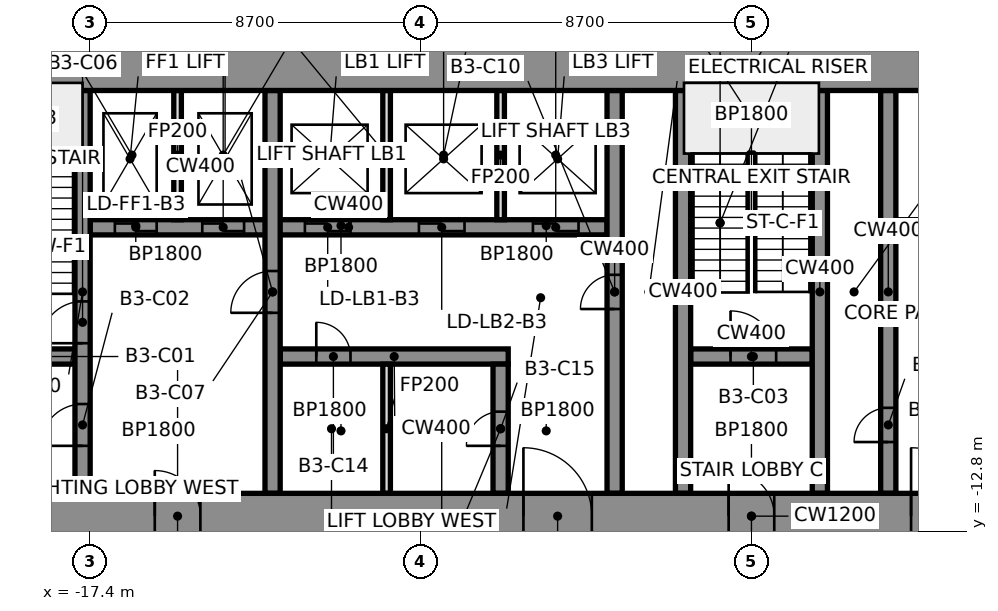
"""IFC4 building model, lengths in metres.
Left out: names, types, materials, properties, quantities, classifications, styles, units other than length and angle.
Written with IfcOpenShell. Run it as: python <this file> out.ifc"""

import sys

from ifc_helpers import new_model, si_unit, direction, frame, frame_2d, origin, place, context, subcontext, project, spatial, rectangle, extrude, element, fill, save


model = new_model("IFC4")
c1 = context("Model", 3, precision=1e-05, world=origin(), true_north=direction((0.0, 1.0)))
c2 = subcontext(c1, "Body", "Model", "MODEL_VIEW")
j1 = project(units=[si_unit("LENGTHUNIT", "METRE"), si_unit("PLANEANGLEUNIT", "RADIAN")], contexts=[c1])
p1 = place(None, origin())
s1 = spatial("IfcSite", under=j1, at=p1, CompositionType="ELEMENT")
p2 = place(p1, origin())
s2 = spatial("IfcBuilding", under=s1, at=p2, CompositionType="ELEMENT")
p3 = place(p2, frame((0.0, 0.0, -15.0)))
s3 = spatial("IfcBuildingStorey", under=s2, at=p3, CompositionType="ELEMENT", Elevation=-15.0)
p4 = place(p3, frame((-20.8, -8.2, 0.0), z_axis=(0.0, 0.0, 1.0), x_axis=(1.0, 0.0, 0.0)))
e1 = element("IfcWall", 1, at=p4, inside=s3, PredefinedType="SHEAR", context=c2, shape_type="SweptSolid", body=[
    extrude(rectangle(XDim=3.0, YDim=0.4, at=frame_2d((1.5, 0.0))), origin(), (0.0, 0.0, 1.0), 5.0),
])
p5 = place(p4, frame((0.85, 0.0, 0.0)))
e2 = element("IfcOpeningElement", 2, at=p5, cuts=e1, PredefinedType="OPENING", context=c2, shape_type="SweptSolid", body=[
    extrude(rectangle(XDim=1.2, YDim=2.1, at=frame_2d((0.6, 1.05))), frame((0.0, 0.212, 0.0), z_axis=(0.0, -1.0, 0.0), x_axis=(1.0, 0.0, 0.0)), (0.0, 0.0, 1.0), 0.424),
])
p6 = place(p3, frame((-12.4, -8.2, 0.0), z_axis=(0.0, 0.0, 1.0), x_axis=(1.0, 0.0, 0.0)))
e3 = element("IfcWall", 3, at=p6, inside=s3, PredefinedType="SHEAR", context=c2, shape_type="SweptSolid", body=[
    extrude(rectangle(XDim=6.0, YDim=0.4, at=frame_2d((3.0, 0.0))), origin(), (0.0, 0.0, 1.0), 5.0),
])
p7 = place(p6, frame((0.95, 0.0, 0.0)))
e4 = element("IfcOpeningElement", 4, at=p7, cuts=e3, PredefinedType="OPENING", context=c2, shape_type="SweptSolid", body=[
    extrude(rectangle(XDim=0.9, YDim=2.1, at=frame_2d((0.45, 1.05))), frame((0.0, 0.212, 0.0), z_axis=(0.0, -1.0, 0.0), x_axis=(1.0, 0.0, 0.0)), (0.0, 0.0, 1.0), 0.424),
])
p8 = place(p3, frame((-1.6, -8.2, 0.0), z_axis=(0.0, 0.0, 1.0), x_axis=(1.0, 0.0, 0.0)))
e5 = element("IfcWall", 5, at=p8, inside=s3, PredefinedType="SHEAR", context=c2, shape_type="SweptSolid", body=[
    extrude(rectangle(XDim=3.2, YDim=0.4, at=frame_2d((1.6, 0.0))), origin(), (0.0, 0.0, 1.0), 5.0),
])
p9 = place(p8, frame((1.05, 0.0, 0.0)))
e6 = element("IfcOpeningElement", 6, at=p9, cuts=e5, PredefinedType="OPENING", context=c2, shape_type="SweptSolid", body=[
    extrude(rectangle(XDim=1.2, YDim=2.1, at=frame_2d((0.6, 1.05))), frame((0.0, 0.212, 0.0), z_axis=(0.0, -1.0, 0.0), x_axis=(1.0, 0.0, 0.0)), (0.0, 0.0, 1.0), 0.424),
])
p10 = place(p3, frame((-17.4, -4.8, 0.0), z_axis=(0.0, 0.0, 1.0), x_axis=(1.0, 0.0, 0.0)))
e7 = element("IfcWall", 7, at=p10, inside=s3, PredefinedType="SHEAR", context=c2, shape_type="SweptSolid", body=[
    extrude(rectangle(XDim=13.6, YDim=0.4, at=frame_2d((6.8, 0.0))), origin(), (0.0, 0.0, 1.0), 5.0),
])
p11 = place(p10, frame((0.65, 0.0, 0.0)))
e8 = element("IfcOpeningElement", 8, at=p11, cuts=e7, PredefinedType="OPENING", context=c2, shape_type="SweptSolid", body=[
    extrude(rectangle(XDim=1.1, YDim=2.1, at=frame_2d((0.55, 1.05))), frame((0.0, 0.212, 0.0), z_axis=(0.0, -1.0, 0.0), x_axis=(1.0, 0.0, 0.0)), (0.0, 0.0, 1.0), 0.424),
])
p12 = place(p10, frame((2.95, 0.0, 0.0)))
e9 = element("IfcOpeningElement", 9, at=p12, cuts=e7, PredefinedType="OPENING", context=c2, shape_type="SweptSolid", body=[
    extrude(rectangle(XDim=1.1, YDim=2.1, at=frame_2d((0.55, 1.05))), frame((0.0, 0.212, 0.0), z_axis=(0.0, -1.0, 0.0), x_axis=(1.0, 0.0, 0.0)), (0.0, 0.0, 1.0), 0.424),
])
p13 = place(p10, frame((5.65, 0.0, 0.0)))
e10 = element("IfcOpeningElement", 10, at=p13, cuts=e7, PredefinedType="OPENING", context=c2, shape_type="SweptSolid", body=[
    extrude(rectangle(XDim=1.2, YDim=2.1, at=frame_2d((0.6, 1.05))), frame((0.0, 0.212, 0.0), z_axis=(0.0, -1.0, 0.0), x_axis=(1.0, 0.0, 0.0)), (0.0, 0.0, 1.0), 0.424),
])
p14 = place(p10, frame((8.65, 0.0, 0.0)))
e11 = element("IfcOpeningElement", 11, at=p14, cuts=e7, PredefinedType="OPENING", context=c2, shape_type="SweptSolid", body=[
    extrude(rectangle(XDim=1.2, YDim=2.1, at=frame_2d((0.6, 1.05))), frame((0.0, 0.212, 0.0), z_axis=(0.0, -1.0, 0.0), x_axis=(1.0, 0.0, 0.0)), (0.0, 0.0, 1.0), 0.424),
])
p15 = place(p10, frame((11.65, 0.0, 0.0)))
e12 = element("IfcOpeningElement", 12, at=p15, cuts=e7, PredefinedType="OPENING", context=c2, shape_type="SweptSolid", body=[
    extrude(rectangle(XDim=1.2, YDim=2.1, at=frame_2d((0.6, 1.05))), frame((0.0, 0.212, 0.0), z_axis=(0.0, -1.0, 0.0), x_axis=(1.0, 0.0, 0.0)), (0.0, 0.0, 1.0), 0.424),
])
p16 = place(p3, frame((3.8, -4.8, 0.0), z_axis=(0.0, 0.0, 1.0), x_axis=(1.0, 0.0, 0.0)))
e13 = element("IfcWall", 13, at=p16, inside=s3, PredefinedType="SHEAR", context=c2, shape_type="SweptSolid", body=[
    extrude(rectangle(XDim=13.6, YDim=0.4, at=frame_2d((6.8, 0.0))), origin(), (0.0, 0.0, 1.0), 5.0),
])
p17 = place(p16, frame((9.45, 0.0, 0.0)))
e14 = element("IfcOpeningElement", 14, at=p17, cuts=e13, PredefinedType="OPENING", context=c2, shape_type="SweptSolid", body=[
    extrude(rectangle(XDim=1.1, YDim=2.1, at=frame_2d((0.55, 1.05))), frame((0.0, 0.212, 0.0), z_axis=(0.0, -1.0, 0.0), x_axis=(1.0, 0.0, 0.0)), (0.0, 0.0, 1.0), 0.424),
])
p18 = place(p16, frame((11.85, 0.0, 0.0)))
e15 = element("IfcOpeningElement", 15, at=p18, cuts=e13, PredefinedType="OPENING", context=c2, shape_type="SweptSolid", body=[
    extrude(rectangle(XDim=1.1, YDim=2.1, at=frame_2d((0.55, 1.05))), frame((0.0, 0.212, 0.0), z_axis=(0.0, -1.0, 0.0), x_axis=(1.0, 0.0, 0.0)), (0.0, 0.0, 1.0), 0.424),
])
p19 = place(p16, frame((2.45, 0.0, 0.0)))
e16 = element("IfcOpeningElement", 16, at=p19, cuts=e13, PredefinedType="OPENING", context=c2, shape_type="SweptSolid", body=[
    extrude(rectangle(XDim=0.9, YDim=2.1, at=frame_2d((0.45, 1.05))), frame((0.0, 0.212, 0.0), z_axis=(0.0, -1.0, 0.0), x_axis=(1.0, 0.0, 0.0)), (0.0, 0.0, 1.0), 0.424),
])
p20 = place(p16, frame((6.85, 0.0, 0.0)))
e17 = element("IfcOpeningElement", 17, at=p20, cuts=e13, PredefinedType="OPENING", context=c2, shape_type="SweptSolid", body=[
    extrude(rectangle(XDim=0.9, YDim=2.1, at=frame_2d((0.45, 1.05))), frame((0.0, 0.212, 0.0), z_axis=(0.0, -1.0, 0.0), x_axis=(1.0, 0.0, 0.0)), (0.0, 0.0, 1.0), 0.424),
])
p21 = place(p3, frame((-17.6, -11.8, 0.0), z_axis=(0.0, 0.0, 1.0), x_axis=(0.0, 1.0, 0.0)))
e18 = element("IfcWall", 18, at=p21, inside=s3, PredefinedType="SHEAR", context=c2, shape_type="SweptSolid", body=[
    extrude(rectangle(XDim=10.6, YDim=0.4, at=frame_2d((5.3, 0.0))), origin(), (0.0, 0.0, 1.0), 5.0),
])
p22 = place(p21, frame((1.25, 0.0, 0.0)))
e19 = element("IfcOpeningElement", 19, at=p22, cuts=e18, PredefinedType="OPENING", context=c2, shape_type="SweptSolid", body=[
    extrude(rectangle(XDim=1.1, YDim=2.1, at=frame_2d((0.55, 1.05))), frame((0.0, 0.212, 0.0), z_axis=(0.0, -1.0, 0.0), x_axis=(1.0, 0.0, 0.0)), (0.0, 0.0, 1.0), 0.424),
])
p23 = place(p21, frame((3.95, 0.0, 0.0)))
e20 = element("IfcOpeningElement", 20, at=p23, cuts=e18, PredefinedType="OPENING", context=c2, shape_type="SweptSolid", body=[
    extrude(rectangle(XDim=1.1, YDim=2.1, at=frame_2d((0.55, 1.05))), frame((0.0, 0.212, 0.0), z_axis=(0.0, -1.0, 0.0), x_axis=(1.0, 0.0, 0.0)), (0.0, 0.0, 1.0), 0.424),
])
p24 = place(p3, frame((-15.1, -4.6, 0.0), z_axis=(0.0, 0.0, 1.0), x_axis=(0.0, 1.0, 0.0)))
e21 = element("IfcWall", 21, at=p24, inside=s3, PredefinedType="PARTITIONING", context=c2, shape_type="SweptSolid", body=[
    extrude(rectangle(XDim=3.4, YDim=0.2, at=frame_2d((1.7, 0.0))), origin(), (0.0, 0.0, 1.0), 4.7),
])
p25 = place(p3, frame((-12.6, -11.8, 0.0), z_axis=(0.0, 0.0, 1.0), x_axis=(0.0, 1.0, 0.0)))
e22 = element("IfcWall", 22, at=p25, inside=s3, PredefinedType="SHEAR", context=c2, shape_type="SweptSolid", body=[
    extrude(rectangle(XDim=10.6, YDim=0.4, at=frame_2d((5.3, 0.0))), origin(), (0.0, 0.0, 1.0), 5.0),
])
p26 = place(p25, frame((4.75, 0.0, 0.0)))
e23 = element("IfcOpeningElement", 23, at=p26, cuts=e22, PredefinedType="OPENING", context=c2, shape_type="SweptSolid", body=[
    extrude(rectangle(XDim=1.1, YDim=2.1, at=frame_2d((0.55, 1.05))), frame((0.0, 0.212, 0.0), z_axis=(0.0, -1.0, 0.0), x_axis=(1.0, 0.0, 0.0)), (0.0, 0.0, 1.0), 0.424),
])
for number, where, z_axis, x_axis in (
    (24, (-9.6, -11.8, 0.0), (0.0, 0.0, 1.0), (0.0, 1.0, 0.0)),
    (25, (-9.6, -4.6, 0.0), (0.0, 0.0, 1.0), (0.0, 1.0, 0.0)),
):
    element("IfcWall", number, at=place(p3, frame(where, z_axis=z_axis, x_axis=x_axis)), inside=s3, PredefinedType="PARTITIONING", context=c2, shape_type="SweptSolid", body=[
        extrude(rectangle(XDim=3.4, YDim=0.2, at=frame_2d((1.7, 0.0))), origin(), (0.0, 0.0, 1.0), 4.7),
    ])
p27 = place(p3, frame((-6.6, -11.8, 0.0), z_axis=(0.0, 0.0, 1.0), x_axis=(0.0, 1.0, 0.0)))
e26 = element("IfcWall", 26, at=p27, inside=s3, PredefinedType="SHEAR", context=c2, shape_type="SweptSolid", body=[
    extrude(rectangle(XDim=3.4, YDim=0.4, at=frame_2d((1.7, 0.0))), origin(), (0.0, 0.0, 1.0), 5.0),
])
p28 = place(p27, frame((1.25, 0.0, 0.0)))
e27 = element("IfcOpeningElement", 27, at=p28, cuts=e26, PredefinedType="OPENING", context=c2, shape_type="SweptSolid", body=[
    extrude(rectangle(XDim=0.9, YDim=2.1, at=frame_2d((0.45, 1.05))), frame((0.0, 0.212, 0.0), z_axis=(0.0, -1.0, 0.0), x_axis=(1.0, 0.0, 0.0)), (0.0, 0.0, 1.0), 0.424),
])
p29 = place(p3, frame((-6.6, -4.6, 0.0), z_axis=(0.0, 0.0, 1.0), x_axis=(0.0, 1.0, 0.0)))
e28 = element("IfcWall", 28, at=p29, inside=s3, PredefinedType="PARTITIONING", context=c2, shape_type="SweptSolid", body=[
    extrude(rectangle(XDim=3.4, YDim=0.2, at=frame_2d((1.7, 0.0))), origin(), (0.0, 0.0, 1.0), 4.7),
])
p30 = place(p3, frame((-3.6, -11.8, 0.0), z_axis=(0.0, 0.0, 1.0), x_axis=(0.0, 1.0, 0.0)))
e29 = element("IfcWall", 29, at=p30, inside=s3, PredefinedType="SHEAR", context=c2, shape_type="SweptSolid", body=[
    extrude(rectangle(XDim=10.6, YDim=0.4, at=frame_2d((5.3, 0.0))), origin(), (0.0, 0.0, 1.0), 5.0),
])
p31 = place(p30, frame((4.85, 0.0, 0.0)))
e30 = element("IfcOpeningElement", 30, at=p31, cuts=e29, PredefinedType="OPENING", context=c2, shape_type="SweptSolid", body=[
    extrude(rectangle(XDim=0.9, YDim=2.1, at=frame_2d((0.45, 1.05))), frame((0.0, 0.212, 0.0), z_axis=(0.0, -1.0, 0.0), x_axis=(1.0, 0.0, 0.0)), (0.0, 0.0, 1.0), 0.424),
])
for number, where, z_axis, x_axis in (
    (31, (-1.8, -11.8, 0.0), (0.0, 0.0, 1.0), (0.0, 1.0, 0.0)),
    (32, (1.8, -11.8, 0.0), (0.0, 0.0, 1.0), (0.0, 1.0, 0.0)),
):
    element("IfcWall", number, at=place(p3, frame(where, z_axis=z_axis, x_axis=x_axis)), inside=s3, PredefinedType="SHEAR", context=c2, shape_type="SweptSolid", body=[
        extrude(rectangle(XDim=10.6, YDim=0.4, at=frame_2d((5.3, 0.0))), origin(), (0.0, 0.0, 1.0), 5.0),
    ])
p32 = place(p3, frame((3.6, -11.8, 0.0), z_axis=(0.0, 0.0, 1.0), x_axis=(0.0, 1.0, 0.0)))
e33 = element("IfcWall", 33, at=p32, inside=s3, PredefinedType="SHEAR", context=c2, shape_type="SweptSolid", body=[
    extrude(rectangle(XDim=10.6, YDim=0.4, at=frame_2d((5.3, 0.0))), origin(), (0.0, 0.0, 1.0), 5.0),
])
p33 = place(p32, frame((1.35, 0.0, 0.0)))
e34 = element("IfcOpeningElement", 34, at=p33, cuts=e33, PredefinedType="OPENING", context=c2, shape_type="SweptSolid", body=[
    extrude(rectangle(XDim=0.9, YDim=2.1, at=frame_2d((0.45, 1.05))), frame((0.0, 0.212, 0.0), z_axis=(0.0, -1.0, 0.0), x_axis=(1.0, 0.0, 0.0)), (0.0, 0.0, 1.0), 0.424),
])
p34 = place(p3, frame((-22.0, -0.6, 0.0), z_axis=(0.0, 0.0, 1.0), x_axis=(1.0, 0.0, 0.0)))
e35 = element("IfcWall", 35, at=p34, inside=s3, PredefinedType="SHEAR", context=c2, shape_type="SweptSolid", body=[
    extrude(rectangle(XDim=44.0, YDim=1.2, at=frame_2d((22.0, 0.0))), origin(), (0.0, 0.0, 1.0), 5.0),
])
p35 = place(p3, frame((-22.0, -12.4, 0.0), z_axis=(0.0, 0.0, 1.0), x_axis=(1.0, 0.0, 0.0)))
e36 = element("IfcWall", 36, at=p35, inside=s3, PredefinedType="SHEAR", context=c2, shape_type="SweptSolid", body=[
    extrude(rectangle(XDim=44.0, YDim=1.2, at=frame_2d((22.0, 0.0))), origin(), (0.0, 0.0, 1.0), 5.0),
])
p36 = place(p35, frame((2.2, 0.0, 0.0)))
e37 = element("IfcOpeningElement", 37, at=p36, cuts=e36, PredefinedType="OPENING", context=c2, shape_type="SweptSolid", body=[
    extrude(rectangle(XDim=1.2, YDim=2.1, at=frame_2d((0.6, 1.05))), frame((0.0, 0.612, 0.0), z_axis=(0.0, -1.0, 0.0), x_axis=(1.0, 0.0, 0.0)), (0.0, 0.0, 1.0), 1.224),
])
p37 = place(p35, frame((21.4, 0.0, 0.0)))
e38 = element("IfcOpeningElement", 38, at=p37, cuts=e36, PredefinedType="OPENING", context=c2, shape_type="SweptSolid", body=[
    extrude(rectangle(XDim=1.2, YDim=2.1, at=frame_2d((0.6, 1.05))), frame((0.0, 0.612, 0.0), z_axis=(0.0, -1.0, 0.0), x_axis=(1.0, 0.0, 0.0)), (0.0, 0.0, 1.0), 1.224),
])
p38 = place(p35, frame((40.6, 0.0, 0.0)))
e39 = element("IfcOpeningElement", 39, at=p38, cuts=e36, PredefinedType="OPENING", context=c2, shape_type="SweptSolid", body=[
    extrude(rectangle(XDim=1.2, YDim=2.1, at=frame_2d((0.6, 1.05))), frame((0.0, 0.612, 0.0), z_axis=(0.0, -1.0, 0.0), x_axis=(1.0, 0.0, 0.0)), (0.0, 0.0, 1.0), 1.224),
])
p39 = place(p35, frame((16.0, 0.0, 0.0)))
e40 = element("IfcOpeningElement", 40, at=p39, cuts=e36, PredefinedType="OPENING", context=c2, shape_type="SweptSolid", body=[
    extrude(rectangle(XDim=1.8, YDim=2.1, at=frame_2d((0.9, 1.05))), frame((0.0, 0.612, 0.0), z_axis=(0.0, -1.0, 0.0), x_axis=(1.0, 0.0, 0.0)), (0.0, 0.0, 1.0), 1.224),
])
p40 = place(p35, frame((6.3, 0.0, 0.0)))
e41 = element("IfcOpeningElement", 41, at=p40, cuts=e36, PredefinedType="OPENING", context=c2, shape_type="SweptSolid", body=[
    extrude(rectangle(XDim=1.2, YDim=2.1, at=frame_2d((0.6, 1.05))), frame((0.0, 0.612, 0.0), z_axis=(0.0, -1.0, 0.0), x_axis=(1.0, 0.0, 0.0)), (0.0, 0.0, 1.0), 1.224),
])
p41 = place(p35, frame((26.2, 0.0, 0.0)))
e42 = element("IfcOpeningElement", 42, at=p41, cuts=e36, PredefinedType="OPENING", context=c2, shape_type="SweptSolid", body=[
    extrude(rectangle(XDim=1.8, YDim=2.1, at=frame_2d((0.9, 1.05))), frame((0.0, 0.612, 0.0), z_axis=(0.0, -1.0, 0.0), x_axis=(1.0, 0.0, 0.0)), (0.0, 0.0, 1.0), 1.224),
])
p42 = place(p35, frame((36.5, 0.0, 0.0)))
e43 = element("IfcOpeningElement", 43, at=p42, cuts=e36, PredefinedType="OPENING", context=c2, shape_type="SweptSolid", body=[
    extrude(rectangle(XDim=1.2, YDim=2.1, at=frame_2d((0.6, 1.05))), frame((0.0, 0.612, 0.0), z_axis=(0.0, -1.0, 0.0), x_axis=(1.0, 0.0, 0.0)), (0.0, 0.0, 1.0), 1.224),
])
p43 = place(p22, frame((1.1, 0.0, 0.0), z_axis=(0.0, 0.0, 1.0), x_axis=(-1.0, 0.0, 0.0)))
e44 = element("IfcDoor", 44, at=p43, inside=s3, OperationType="SINGLE_SWING_LEFT", PredefinedType="DOOR", context=c2, shape_type="SweptSolid", body=[
    extrude(rectangle(XDim=1.1, YDim=2.1, at=frame_2d((0.55, 1.05))), frame((0.0, 0.025, 0.0), z_axis=(0.0, -1.0, 0.0), x_axis=(1.0, 0.0, 0.0)), (0.0, 0.0, 1.0), 0.05),
])
fill(e19, e44)
p44 = place(p9, origin())
e45 = element("IfcDoor", 45, at=p44, inside=s3, OperationType="SINGLE_SWING_LEFT", PredefinedType="DOOR", context=c2, shape_type="SweptSolid", body=[
    extrude(rectangle(XDim=1.2, YDim=2.1, at=frame_2d((0.6, 1.05))), frame((0.0, 0.025, 0.0), z_axis=(0.0, -1.0, 0.0), x_axis=(1.0, 0.0, 0.0)), (0.0, 0.0, 1.0), 0.05),
])
fill(e6, e45)
p45 = place(p11, origin())
e46 = element("IfcDoor", 46, at=p45, inside=s3, OperationType="DOUBLE_DOOR_SLIDING", PredefinedType="DOOR", context=c2, shape_type="SweptSolid", body=[
    extrude(rectangle(XDim=1.1, YDim=2.1, at=frame_2d((0.55, 1.05))), frame((0.0, 0.025, 0.0), z_axis=(0.0, -1.0, 0.0), x_axis=(1.0, 0.0, 0.0)), (0.0, 0.0, 1.0), 0.05),
])
fill(e8, e46)
p46 = place(p12, origin())
e47 = element("IfcDoor", 47, at=p46, inside=s3, OperationType="DOUBLE_DOOR_SLIDING", PredefinedType="DOOR", context=c2, shape_type="SweptSolid", body=[
    extrude(rectangle(XDim=1.1, YDim=2.1, at=frame_2d((0.55, 1.05))), frame((0.0, 0.025, 0.0), z_axis=(0.0, -1.0, 0.0), x_axis=(1.0, 0.0, 0.0)), (0.0, 0.0, 1.0), 0.05),
])
fill(e9, e47)
p47 = place(p13, origin())
e48 = element("IfcDoor", 48, at=p47, inside=s3, OperationType="DOUBLE_DOOR_SLIDING", PredefinedType="DOOR", context=c2, shape_type="SweptSolid", body=[
    extrude(rectangle(XDim=1.2, YDim=2.1, at=frame_2d((0.6, 1.05))), frame((0.0, 0.025, 0.0), z_axis=(0.0, -1.0, 0.0), x_axis=(1.0, 0.0, 0.0)), (0.0, 0.0, 1.0), 0.05),
])
fill(e10, e48)
p48 = place(p14, origin())
e49 = element("IfcDoor", 49, at=p48, inside=s3, OperationType="DOUBLE_DOOR_SLIDING", PredefinedType="DOOR", context=c2, shape_type="SweptSolid", body=[
    extrude(rectangle(XDim=1.2, YDim=2.1, at=frame_2d((0.6, 1.05))), frame((0.0, 0.025, 0.0), z_axis=(0.0, -1.0, 0.0), x_axis=(1.0, 0.0, 0.0)), (0.0, 0.0, 1.0), 0.05),
])
fill(e11, e49)
p49 = place(p15, origin())
e50 = element("IfcDoor", 50, at=p49, inside=s3, OperationType="DOUBLE_DOOR_SLIDING", PredefinedType="DOOR", context=c2, shape_type="SweptSolid", body=[
    extrude(rectangle(XDim=1.2, YDim=2.1, at=frame_2d((0.6, 1.05))), frame((0.0, 0.025, 0.0), z_axis=(0.0, -1.0, 0.0), x_axis=(1.0, 0.0, 0.0)), (0.0, 0.0, 1.0), 0.05),
])
fill(e12, e50)
p50 = place(p23, frame((1.1, 0.0, 0.0), z_axis=(0.0, 0.0, 1.0), x_axis=(-1.0, 0.0, 0.0)))
e51 = element("IfcDoor", 51, at=p50, inside=s3, OperationType="SINGLE_SWING_LEFT", PredefinedType="DOOR", context=c2, shape_type="SweptSolid", body=[
    extrude(rectangle(XDim=1.1, YDim=2.1, at=frame_2d((0.55, 1.05))), frame((0.0, 0.025, 0.0), z_axis=(0.0, -1.0, 0.0), x_axis=(1.0, 0.0, 0.0)), (0.0, 0.0, 1.0), 0.05),
])
fill(e20, e51)
p51 = place(p26, origin())
e52 = element("IfcDoor", 52, at=p51, inside=s3, OperationType="SINGLE_SWING_LEFT", PredefinedType="DOOR", context=c2, shape_type="SweptSolid", body=[
    extrude(rectangle(XDim=1.1, YDim=2.1, at=frame_2d((0.55, 1.05))), frame((0.0, 0.025, 0.0), z_axis=(0.0, -1.0, 0.0), x_axis=(1.0, 0.0, 0.0)), (0.0, 0.0, 1.0), 0.05),
])
fill(e23, e52)
p52 = place(p31, frame((0.9, 0.0, 0.0), z_axis=(0.0, 0.0, 1.0), x_axis=(-1.0, 0.0, 0.0)))
e53 = element("IfcDoor", 53, at=p52, inside=s3, OperationType="SINGLE_SWING_LEFT", PredefinedType="DOOR", context=c2, shape_type="SweptSolid", body=[
    extrude(rectangle(XDim=0.9, YDim=2.1, at=frame_2d((0.45, 1.05))), frame((0.0, 0.025, 0.0), z_axis=(0.0, -1.0, 0.0), x_axis=(1.0, 0.0, 0.0)), (0.0, 0.0, 1.0), 0.05),
])
fill(e30, e53)
p53 = place(p33, origin())
e54 = element("IfcDoor", 54, at=p53, inside=s3, OperationType="SINGLE_SWING_LEFT", PredefinedType="DOOR", context=c2, shape_type="SweptSolid", body=[
    extrude(rectangle(XDim=0.9, YDim=2.1, at=frame_2d((0.45, 1.05))), frame((0.0, 0.025, 0.0), z_axis=(0.0, -1.0, 0.0), x_axis=(1.0, 0.0, 0.0)), (0.0, 0.0, 1.0), 0.05),
])
fill(e34, e54)
p54 = place(p7, frame((0.9, 0.0, 0.0), z_axis=(0.0, 0.0, 1.0), x_axis=(-1.0, 0.0, 0.0)))
e55 = element("IfcDoor", 55, at=p54, inside=s3, OperationType="SINGLE_SWING_LEFT", PredefinedType="DOOR", context=c2, shape_type="SweptSolid", body=[
    extrude(rectangle(XDim=0.9, YDim=2.1, at=frame_2d((0.45, 1.05))), frame((0.0, 0.025, 0.0), z_axis=(0.0, -1.0, 0.0), x_axis=(1.0, 0.0, 0.0)), (0.0, 0.0, 1.0), 0.05),
])
fill(e4, e55)
p55 = place(p28, origin())
e56 = element("IfcDoor", 56, at=p55, inside=s3, OperationType="SINGLE_SWING_LEFT", PredefinedType="DOOR", context=c2, shape_type="SweptSolid", body=[
    extrude(rectangle(XDim=0.9, YDim=2.1, at=frame_2d((0.45, 1.05))), frame((0.0, 0.025, 0.0), z_axis=(0.0, -1.0, 0.0), x_axis=(1.0, 0.0, 0.0)), (0.0, 0.0, 1.0), 0.05),
])
fill(e27, e56)
p56 = place(p37, frame((1.2, 0.0, 0.0), z_axis=(0.0, 0.0, 1.0), x_axis=(-1.0, 0.0, 0.0)))
e57 = element("IfcDoor", 57, at=p56, inside=s3, OperationType="SINGLE_SWING_RIGHT", PredefinedType="DOOR", context=c2, shape_type="SweptSolid", body=[
    extrude(rectangle(XDim=1.2, YDim=2.1, at=frame_2d((0.6, 1.05))), frame((0.0, 0.025, 0.0), z_axis=(0.0, -1.0, 0.0), x_axis=(1.0, 0.0, 0.0)), (0.0, 0.0, 1.0), 0.05),
])
fill(e38, e57)
p57 = place(p39, origin())
e58 = element("IfcDoor", 58, at=p57, inside=s3, OperationType="SINGLE_SWING_LEFT", PredefinedType="DOOR", context=c2, shape_type="SweptSolid", body=[
    extrude(rectangle(XDim=1.8, YDim=2.1, at=frame_2d((0.9, 1.05))), frame((0.0, 0.025, 0.0), z_axis=(0.0, -1.0, 0.0), x_axis=(1.0, 0.0, 0.0)), (0.0, 0.0, 1.0), 0.05),
])
fill(e40, e58)
p58 = place(p40, frame((1.2, 0.0, 0.0), z_axis=(0.0, 0.0, 1.0), x_axis=(-1.0, 0.0, 0.0)))
e59 = element("IfcDoor", 59, at=p58, inside=s3, OperationType="SINGLE_SWING_RIGHT", PredefinedType="DOOR", context=c2, shape_type="SweptSolid", body=[
    extrude(rectangle(XDim=1.2, YDim=2.1, at=frame_2d((0.6, 1.05))), frame((0.0, 0.025, 0.0), z_axis=(0.0, -1.0, 0.0), x_axis=(1.0, 0.0, 0.0)), (0.0, 0.0, 1.0), 0.05),
])
fill(e41, e59)
p59 = place(p41, origin())
e60 = element("IfcDoor", 60, at=p59, inside=s3, OperationType="SINGLE_SWING_LEFT", PredefinedType="DOOR", context=c2, shape_type="SweptSolid", body=[
    extrude(rectangle(XDim=1.8, YDim=2.1, at=frame_2d((0.9, 1.05))), frame((0.0, 0.025, 0.0), z_axis=(0.0, -1.0, 0.0), x_axis=(1.0, 0.0, 0.0)), (0.0, 0.0, 1.0), 0.05),
])
fill(e42, e60)
save(model, sys.argv[1])
